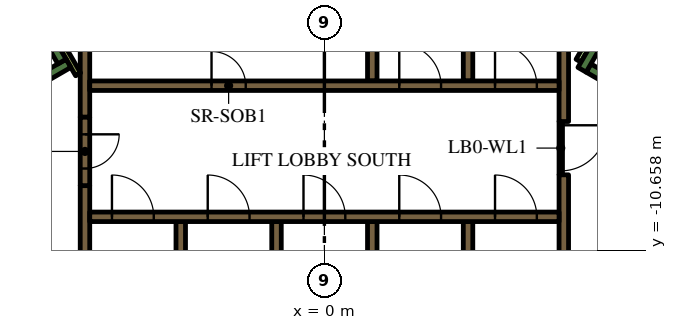
"""IFC4 building model, lengths in metres.
Left out: names, types, materials, properties, quantities, classifications, styles, units other than length and angle.
Written with IfcOpenShell. Run it as: python <this file> out.ifc"""

import sys

from ifc_helpers import new_model, si_unit, direction, frame, frame_2d, origin, place, context, subcontext, project, spatial, rectangle, extrude, element, fill, save


model = new_model("IFC4")
c1 = context("Model", 3, precision=1e-05, world=origin(), true_north=direction((0.0, 1.0)))
c2 = subcontext(c1, "Body", "Model", "MODEL_VIEW")
j1 = project(units=[si_unit("LENGTHUNIT", "METRE"), si_unit("PLANEANGLEUNIT", "RADIAN")], contexts=[c1])
p1 = place(None, origin())
s1 = spatial("IfcSite", under=j1, at=p1, CompositionType="ELEMENT")
p2 = place(p1, origin())
s2 = spatial("IfcBuilding", under=s1, at=p2, CompositionType="ELEMENT")
p3 = place(p2, frame((0.0, 0.0, 54.9)))
s3 = spatial("IfcBuildingStorey", under=s2, at=p3, CompositionType="ELEMENT", Elevation=54.9)
p4 = place(p3, frame((12.84, -9.261, 0.0), z_axis=(0.0, 0.0, 1.0), x_axis=(-0.866013990052, 0.500019768644, 0.0)))
e1 = element("IfcWall", 1, at=p4, inside=s3, PredefinedType="SOLIDWALL", context=c2, shape_type="SweptSolid", body=[
    extrude(rectangle(XDim=6.8, YDim=0.25, at=frame_2d((3.4, 0.0))), origin(), (0.0, 0.0, 1.0), 3.9),
])
p5 = place(p3, frame((7.113, -5.33, 0.0), z_axis=(0.0, 0.0, 1.0), x_axis=(-0.499965889992, -0.866045096311, 0.0)))
e2 = element("IfcWall", 2, at=p5, inside=s3, PredefinedType="SOLIDWALL", context=c2, shape_type="SweptSolid", body=[
    extrude(rectangle(XDim=0.666, YDim=0.25, at=frame_2d((0.333, 0.0))), origin(), (0.0, 0.0, 1.0), 3.9),
])
p6 = place(p3, frame((-12.84, -9.261, 0.0), z_axis=(0.0, 0.0, 1.0), x_axis=(0.866016039709, 0.500016218704, 0.0)))
e3 = element("IfcWall", 3, at=p6, inside=s3, PredefinedType="SOLIDWALL", context=c2, shape_type="SweptSolid", body=[
    extrude(rectangle(XDim=7.05, YDim=0.25, at=frame_2d((3.525, 0.0))), origin(), (0.0, 0.0, 1.0), 3.9),
])
p7 = place(p3, frame((-6.905, -5.69, 0.0), z_axis=(0.0, 0.0, 1.0), x_axis=(-0.499993700073, 0.866029041019, 0.0)))
e4 = element("IfcWall", 4, at=p7, inside=s3, PredefinedType="SOLIDWALL", context=c2, shape_type="SweptSolid", body=[
    extrude(rectangle(XDim=0.416, YDim=0.25, at=frame_2d((0.208, 0.0))), origin(), (0.0, 0.0, 1.0), 3.9),
])
p8 = place(p3, frame((-3.78, -12.1, 0.0), z_axis=(0.0, 0.0, 1.0), x_axis=(0.0, 1.0, 0.0)))
e5 = element("IfcWall", 5, at=p8, inside=s3, PredefinedType="SOLIDWALL", context=c2, shape_type="SweptSolid", body=[
    extrude(rectangle(XDim=2.2, YDim=0.25, at=frame_2d((1.1, 0.0))), origin(), (0.0, 0.0, 1.0), 3.9),
])
p9 = place(p3, frame((-6.3, -12.1, 0.0), z_axis=(0.0, 0.0, 1.0), x_axis=(0.0, 1.0, 0.0)))
e6 = element("IfcWall", 6, at=p9, inside=s3, PredefinedType="SOLIDWALL", context=c2, shape_type="SweptSolid", body=[
    extrude(rectangle(XDim=3.146, YDim=0.25, at=frame_2d((1.573, 0.0))), origin(), (0.0, 0.0, 1.0), 3.9),
])
p10 = place(p3, frame((-6.3, -4.24, 0.0), z_axis=(0.0, 0.0, 1.0), x_axis=(0.0, -1.0, 0.0)))
e7 = element("IfcWall", 7, at=p10, inside=s3, PredefinedType="SOLIDWALL", context=c2, shape_type="SweptSolid", body=[
    extrude(rectangle(XDim=2.914, YDim=0.25, at=frame_2d((1.457, 0.0))), origin(), (0.0, 0.0, 1.0), 3.9),
])
p11 = place(p3, frame((6.3, -8.67, 0.0), z_axis=(0.0, 0.0, 1.0), x_axis=(0.0, -1.0, 0.0)))
e8 = element("IfcWall", 8, at=p11, inside=s3, PredefinedType="SOLIDWALL", context=c2, shape_type="SweptSolid", body=[
    extrude(rectangle(XDim=3.43, YDim=0.25, at=frame_2d((1.715, 0.0))), origin(), (0.0, 0.0, 1.0), 3.9),
])
p12 = place(p3, frame((6.3, -7.268, 0.0), z_axis=(0.0, 0.0, 1.0), x_axis=(0.0, 1.0, 0.0)))
e9 = element("IfcWall", 9, at=p12, inside=s3, PredefinedType="SOLIDWALL", context=c2, shape_type="SweptSolid", body=[
    extrude(rectangle(XDim=3.268, YDim=0.25, at=frame_2d((1.634, 0.0))), origin(), (0.0, 0.0, 1.0), 3.9),
])
for number, where, z_axis, x_axis in (
    (10, (3.78, -4.0, 0.0), (0.0, 0.0, 1.0), (0.0, -1.0, 0.0)),
    (11, (1.26, -4.0, 0.0), (0.0, 0.0, 1.0), (0.0, -1.0, 0.0)),
    (12, (3.78, -12.1, 0.0), (0.0, 0.0, 1.0), (0.0, 1.0, 0.0)),
    (13, (1.26, -12.1, 0.0), (0.0, 0.0, 1.0), (0.0, 1.0, 0.0)),
    (14, (-1.26, -12.1, 0.0), (0.0, 0.0, 1.0), (0.0, 1.0, 0.0)),
):
    element("IfcWall", number, at=place(p3, frame(where, z_axis=z_axis, x_axis=x_axis)), inside=s3, PredefinedType="SOLIDWALL", context=c2, shape_type="SweptSolid", body=[
        extrude(rectangle(XDim=2.2, YDim=0.25, at=frame_2d((1.1, 0.0))), origin(), (0.0, 0.0, 1.0), 3.9),
    ])
p13 = place(p3, frame((-6.48, -6.027, 0.0), z_axis=(0.0, 0.0, 1.0), x_axis=(-0.499936960004, 0.866061796884, 0.0)))
e15 = element("IfcWall", 15, at=p13, inside=s3, PredefinedType="PARTITIONING", context=c2, shape_type="SweptSolid", body=[
    extrude(rectangle(XDim=0.919, YDim=0.15, at=frame_2d((0.46, 0.0))), origin(), (0.0, 0.0, 1.0), 3.9),
])
p14 = place(p3, frame((6.688, -5.667, 0.0), z_axis=(0.0, 0.0, 1.0), x_axis=(0.499834152157, 0.86612113491, 0.0)))
e16 = element("IfcWall", 16, at=p14, inside=s3, PredefinedType="PARTITIONING", context=c2, shape_type="SweptSolid", body=[
    extrude(rectangle(XDim=0.505, YDim=0.15, at=frame_2d((0.252, 0.0))), origin(), (0.0, 0.0, 1.0), 2.75),
])
p15 = place(p3, frame((-6.175, -9.775, 0.0), z_axis=(0.0, 0.0, 1.0), x_axis=(1.0, 0.0, 0.0)))
e17 = element("IfcWall", 17, at=p15, inside=s3, PredefinedType="SOLIDWALL", context=c2, shape_type="SweptSolid", body=[
    extrude(rectangle(XDim=12.35, YDim=0.25, at=frame_2d((6.175, 0.0))), origin(), (0.0, 0.0, 1.0), 3.9),
])
p16 = place(p15, frame((0.585, 0.0, 0.0)))
e18 = element("IfcOpeningElement", 18, at=p16, cuts=e17, PredefinedType="OPENING", context=c2, shape_type="SweptSolid", body=[
    extrude(rectangle(XDim=1.1, YDim=2.1, at=frame_2d((0.55, 1.05))), frame((0.0, 0.135, 0.0), z_axis=(0.0, -1.0, 0.0), x_axis=(1.0, 0.0, 0.0)), (0.0, 0.0, 1.0), 0.27),
])
p17 = place(p15, frame((3.105, 0.0, 0.0)))
e19 = element("IfcOpeningElement", 19, at=p17, cuts=e17, PredefinedType="OPENING", context=c2, shape_type="SweptSolid", body=[
    extrude(rectangle(XDim=1.1, YDim=2.1, at=frame_2d((0.55, 1.05))), frame((0.0, 0.135, 0.0), z_axis=(0.0, -1.0, 0.0), x_axis=(1.0, 0.0, 0.0)), (0.0, 0.0, 1.0), 0.27),
])
p18 = place(p15, frame((5.625, 0.0, 0.0)))
e20 = element("IfcOpeningElement", 20, at=p18, cuts=e17, PredefinedType="OPENING", context=c2, shape_type="SweptSolid", body=[
    extrude(rectangle(XDim=1.1, YDim=2.1, at=frame_2d((0.55, 1.05))), frame((0.0, 0.135, 0.0), z_axis=(0.0, -1.0, 0.0), x_axis=(1.0, 0.0, 0.0)), (0.0, 0.0, 1.0), 0.27),
])
p19 = place(p15, frame((8.145, 0.0, 0.0)))
e21 = element("IfcOpeningElement", 21, at=p19, cuts=e17, PredefinedType="OPENING", context=c2, shape_type="SweptSolid", body=[
    extrude(rectangle(XDim=1.1, YDim=2.1, at=frame_2d((0.55, 1.05))), frame((0.0, 0.135, 0.0), z_axis=(0.0, -1.0, 0.0), x_axis=(1.0, 0.0, 0.0)), (0.0, 0.0, 1.0), 0.27),
])
p20 = place(p15, frame((10.665, 0.0, 0.0)))
e22 = element("IfcOpeningElement", 22, at=p20, cuts=e17, PredefinedType="OPENING", context=c2, shape_type="SweptSolid", body=[
    extrude(rectangle(XDim=1.1, YDim=2.1, at=frame_2d((0.55, 1.05))), frame((0.0, 0.135, 0.0), z_axis=(0.0, -1.0, 0.0), x_axis=(1.0, 0.0, 0.0)), (0.0, 0.0, 1.0), 0.27),
])
p21 = place(p3, frame((-6.175, -6.325, 0.0), z_axis=(0.0, 0.0, 1.0), x_axis=(1.0, 0.0, 0.0)))
e23 = element("IfcWall", 23, at=p21, inside=s3, PredefinedType="SOLIDWALL", context=c2, shape_type="SweptSolid", body=[
    extrude(rectangle(XDim=12.35, YDim=0.25, at=frame_2d((6.175, 0.0))), origin(), (0.0, 0.0, 1.0), 3.9),
])
p22 = place(p21, frame((3.205, 0.0, 0.0)))
e24 = element("IfcOpeningElement", 24, at=p22, cuts=e23, PredefinedType="OPENING", context=c2, shape_type="SweptSolid", body=[
    extrude(rectangle(XDim=0.9, YDim=2.1, at=frame_2d((0.45, 1.05))), frame((0.0, 0.135, 0.0), z_axis=(0.0, -1.0, 0.0), x_axis=(1.0, 0.0, 0.0)), (0.0, 0.0, 1.0), 0.27),
])
p23 = place(p21, frame((8.145, 0.0, 0.0)))
e25 = element("IfcOpeningElement", 25, at=p23, cuts=e23, PredefinedType="OPENING", context=c2, shape_type="SweptSolid", body=[
    extrude(rectangle(XDim=1.1, YDim=2.1, at=frame_2d((0.55, 1.05))), frame((0.0, 0.135, 0.0), z_axis=(0.0, -1.0, 0.0), x_axis=(1.0, 0.0, 0.0)), (0.0, 0.0, 1.0), 0.27),
])
p24 = place(p21, frame((10.665, 0.0, 0.0)))
e26 = element("IfcOpeningElement", 26, at=p24, cuts=e23, PredefinedType="OPENING", context=c2, shape_type="SweptSolid", body=[
    extrude(rectangle(XDim=1.1, YDim=2.1, at=frame_2d((0.55, 1.05))), frame((0.0, 0.135, 0.0), z_axis=(0.0, -1.0, 0.0), x_axis=(1.0, 0.0, 0.0)), (0.0, 0.0, 1.0), 0.27),
])
p25 = place(p3, frame((-6.3, -7.154, 0.0), z_axis=(0.0, 0.0, 1.0), x_axis=(0.0, -1.0, 0.0)))
e27 = element("IfcWall", 27, at=p25, inside=s3, PredefinedType="SOLIDWALL", context=c2, shape_type="SweptSolid", body=[
    extrude(rectangle(XDim=1.8, YDim=0.25, at=frame_2d((0.9, 0.0))), origin(), (0.0, 0.0, 1.0), 3.9),
])
p26 = place(p25, frame((0.45, 0.0, 0.0)))
e28 = element("IfcOpeningElement", 28, at=p26, cuts=e27, PredefinedType="OPENING", context=c2, shape_type="SweptSolid", body=[
    extrude(rectangle(XDim=0.9, YDim=2.1, at=frame_2d((0.45, 1.05))), frame((0.0, 0.135, 0.0), z_axis=(0.0, -1.0, 0.0), x_axis=(1.0, 0.0, 0.0)), (0.0, 0.0, 1.0), 0.27),
])
p27 = place(p3, frame((6.22, -7.266, 0.0), z_axis=(0.0, 0.0, 1.0), x_axis=(0.0, -1.0, 0.0)))
e29 = element("IfcWall", 29, at=p27, inside=s3, PredefinedType="PARTITIONING", context=c2, shape_type="SweptSolid", body=[
    extrude(rectangle(XDim=1.4, YDim=0.09, at=frame_2d((0.7, 0.0))), origin(), (0.0, 0.0, 1.0), 2.75),
])
p28 = place(p27, frame((0.1, 0.0, 0.0)))
e30 = element("IfcOpeningElement", 30, at=p28, cuts=e29, PredefinedType="OPENING", context=c2, shape_type="SweptSolid", body=[
    extrude(rectangle(XDim=1.2, YDim=2.1, at=frame_2d((0.6, 1.05))), frame((0.0, 0.055, 0.0), z_axis=(0.0, -1.0, 0.0), x_axis=(1.0, 0.0, 0.0)), (0.0, 0.0, 1.0), 0.11),
])
p29 = place(p16, origin())
e31 = element("IfcDoor", 31, at=p29, inside=s3, OperationType="DOUBLE_DOOR_SLIDING", PredefinedType="DOOR", context=c2, shape_type="SweptSolid", body=[
    extrude(rectangle(XDim=1.1, YDim=2.1, at=frame_2d((0.55, 1.05))), frame((0.0, 0.025, 0.0), z_axis=(0.0, -1.0, 0.0), x_axis=(1.0, 0.0, 0.0)), (0.0, 0.0, 1.0), 0.05),
])
fill(e18, e31)
p30 = place(p17, origin())
e32 = element("IfcDoor", 32, at=p30, inside=s3, OperationType="DOUBLE_DOOR_SLIDING", PredefinedType="DOOR", context=c2, shape_type="SweptSolid", body=[
    extrude(rectangle(XDim=1.1, YDim=2.1, at=frame_2d((0.55, 1.05))), frame((0.0, 0.025, 0.0), z_axis=(0.0, -1.0, 0.0), x_axis=(1.0, 0.0, 0.0)), (0.0, 0.0, 1.0), 0.05),
])
fill(e19, e32)
p31 = place(p18, origin())
e33 = element("IfcDoor", 33, at=p31, inside=s3, OperationType="DOUBLE_DOOR_SLIDING", PredefinedType="DOOR", context=c2, shape_type="SweptSolid", body=[
    extrude(rectangle(XDim=1.1, YDim=2.1, at=frame_2d((0.55, 1.05))), frame((0.0, 0.025, 0.0), z_axis=(0.0, -1.0, 0.0), x_axis=(1.0, 0.0, 0.0)), (0.0, 0.0, 1.0), 0.05),
])
fill(e20, e33)
p32 = place(p19, origin())
e34 = element("IfcDoor", 34, at=p32, inside=s3, OperationType="DOUBLE_DOOR_SLIDING", PredefinedType="DOOR", context=c2, shape_type="SweptSolid", body=[
    extrude(rectangle(XDim=1.1, YDim=2.1, at=frame_2d((0.55, 1.05))), frame((0.0, 0.025, 0.0), z_axis=(0.0, -1.0, 0.0), x_axis=(1.0, 0.0, 0.0)), (0.0, 0.0, 1.0), 0.05),
])
fill(e21, e34)
p33 = place(p20, origin())
e35 = element("IfcDoor", 35, at=p33, inside=s3, OperationType="DOUBLE_DOOR_SLIDING", PredefinedType="DOOR", context=c2, shape_type="SweptSolid", body=[
    extrude(rectangle(XDim=1.1, YDim=2.1, at=frame_2d((0.55, 1.05))), frame((0.0, 0.025, 0.0), z_axis=(0.0, -1.0, 0.0), x_axis=(1.0, 0.0, 0.0)), (0.0, 0.0, 1.0), 0.05),
])
fill(e22, e35)
p34 = place(p22, origin())
e36 = element("IfcDoor", 36, at=p34, inside=s3, OperationType="SINGLE_SWING_LEFT", PredefinedType="DOOR", context=c2, shape_type="SweptSolid", body=[
    extrude(rectangle(XDim=0.9, YDim=2.1, at=frame_2d((0.45, 1.05))), frame((0.0, 0.025, 0.0), z_axis=(0.0, -1.0, 0.0), x_axis=(1.0, 0.0, 0.0)), (0.0, 0.0, 1.0), 0.05),
])
fill(e24, e36)
p35 = place(p23, origin())
e37 = element("IfcDoor", 37, at=p35, inside=s3, OperationType="DOUBLE_DOOR_SLIDING", PredefinedType="DOOR", context=c2, shape_type="SweptSolid", body=[
    extrude(rectangle(XDim=1.1, YDim=2.1, at=frame_2d((0.55, 1.05))), frame((0.0, 0.025, 0.0), z_axis=(0.0, -1.0, 0.0), x_axis=(1.0, 0.0, 0.0)), (0.0, 0.0, 1.0), 0.05),
])
fill(e25, e37)
p36 = place(p24, origin())
e38 = element("IfcDoor", 38, at=p36, inside=s3, OperationType="DOUBLE_DOOR_SLIDING", PredefinedType="DOOR", context=c2, shape_type="SweptSolid", body=[
    extrude(rectangle(XDim=1.1, YDim=2.1, at=frame_2d((0.55, 1.05))), frame((0.0, 0.025, 0.0), z_axis=(0.0, -1.0, 0.0), x_axis=(1.0, 0.0, 0.0)), (0.0, 0.0, 1.0), 0.05),
])
fill(e26, e38)
p37 = place(p26, origin())
e39 = element("IfcDoor", 39, at=p37, inside=s3, OperationType="SINGLE_SWING_LEFT", PredefinedType="DOOR", context=c2, shape_type="SweptSolid", body=[
    extrude(rectangle(XDim=0.9, YDim=2.1, at=frame_2d((0.45, 1.05))), frame((0.0, 0.025, 0.0), z_axis=(0.0, -1.0, 0.0), x_axis=(1.0, 0.0, 0.0)), (0.0, 0.0, 1.0), 0.05),
])
fill(e28, e39)
p38 = place(p28, origin())
e40 = element("IfcDoor", 40, at=p38, inside=s3, OperationType="SINGLE_SWING_LEFT", PredefinedType="DOOR", context=c2, shape_type="SweptSolid", body=[
    extrude(rectangle(XDim=1.2, YDim=2.1, at=frame_2d((0.6, 1.05))), frame((0.0, 0.025, 0.0), z_axis=(0.0, -1.0, 0.0), x_axis=(1.0, 0.0, 0.0)), (0.0, 0.0, 1.0), 0.05),
])
fill(e30, e40)
save(model, sys.argv[1])
